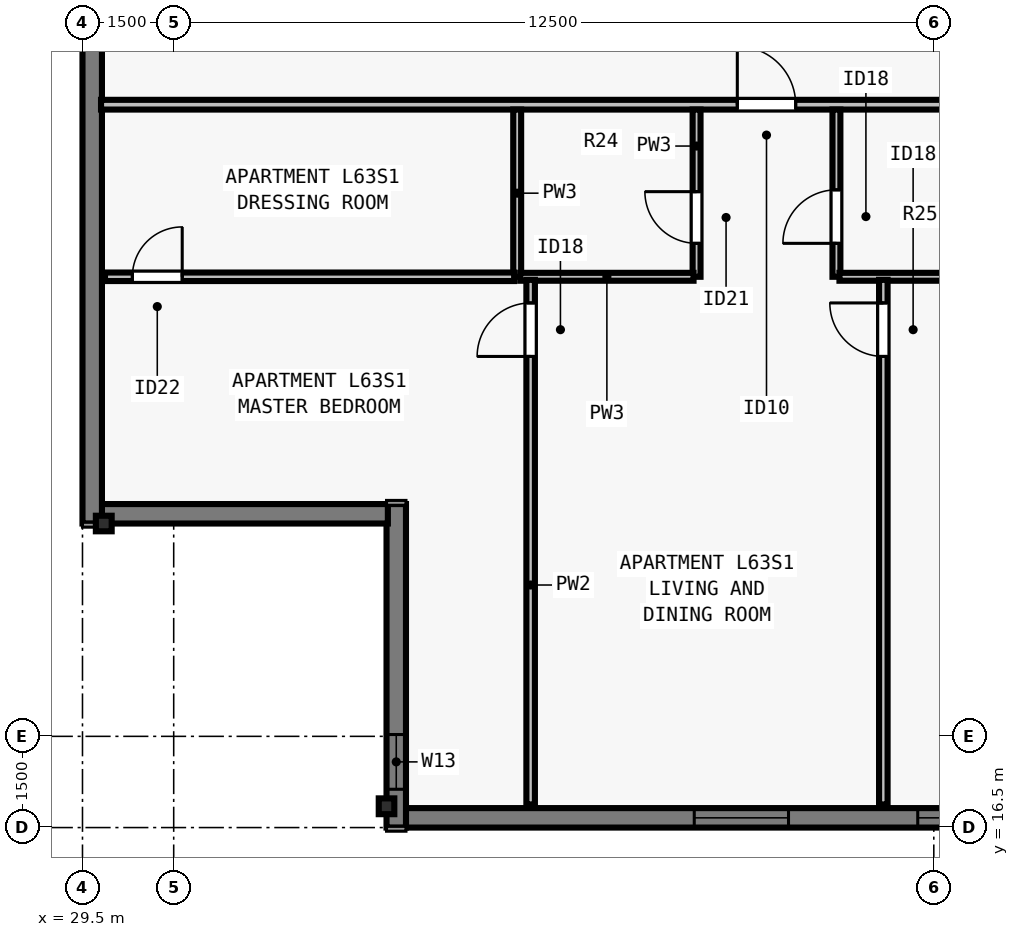
"""IFC4 building model, lengths in metres.
Left out: names, types, materials, properties, quantities, classifications, styles, units other than length and angle.
Written with IfcOpenShell. Run it as: python <this file> out.ifc"""

import sys

from ifc_helpers import new_model, si_unit, direction, frame, frame_2d, origin, origin_2d, place, context, subcontext, project, spatial, rectangle, i_section, extrude, element, fill, save


model = new_model("IFC4")
c1 = context("Model", 3, precision=1e-05, world=origin(), true_north=direction((0.0, 1.0)))
c2 = subcontext(c1, "Body", "Model", "MODEL_VIEW")
j1 = project(units=[si_unit("LENGTHUNIT", "METRE"), si_unit("PLANEANGLEUNIT", "RADIAN")], contexts=[c1])
p1 = place(None, origin())
s1 = spatial("IfcSite", under=j1, at=p1, CompositionType="ELEMENT")
p2 = place(p1, origin())
s2 = spatial("IfcBuilding", under=s1, at=p2, CompositionType="ELEMENT")
p3 = place(p2, frame((0.0, 0.0, 230.5)))
s3 = spatial("IfcBuildingStorey", under=s2, at=p3, CompositionType="ELEMENT", Elevation=230.5)
for number, where, z_axis, x_axis in (
    (1, (34.5, 16.85, 0.0), (0.0, 0.0, 1.0), (1.0, 0.0, 0.0)),
    (2, (29.85, 21.5, 0.0), (0.0, 0.0, 1.0), (0.0, 1.0, 0.0)),
):
    element("IfcColumn", number, at=place(p3, frame(where, z_axis=z_axis, x_axis=x_axis)), inside=s3, PredefinedType="COLUMN", context=c2, shape_type="SweptSolid", body=[
        extrude(i_section(OverallWidth=0.256, OverallDepth=0.26, WebThickness=0.01, FlangeThickness=0.017, FilletRadius=0.013, at=origin_2d()), origin(), (0.0, 0.0, 1.0), 3.5),
    ])
p4 = place(p3, frame((69.5, 16.66, 0.0), z_axis=(0.0, 0.0, 1.0), x_axis=(-1.0, 0.0, 0.0)))
e3 = element("IfcWall", 3, at=p4, inside=s3, PredefinedType="SOLIDWALL", context=c2, shape_type="SweptSolid", body=[
    extrude(rectangle(XDim=34.702, YDim=0.32, at=frame_2d((17.351, 0.0))), origin(), (0.0, 0.0, 1.0), 3.29),
])
p5 = place(p4, frame((5.863, 0.0, 0.8)))
e4 = element("IfcOpeningElement", 4, at=p5, cuts=e3, PredefinedType="OPENING", context=c2, shape_type="SweptSolid", body=[
    extrude(rectangle(XDim=1.85, YDim=1.678, at=frame_2d((0.925, 0.839))), frame((0.0, 0.17, 0.0), z_axis=(0.0, -1.0, 0.0), x_axis=(1.0, 0.0, 0.0)), (0.0, 0.0, 1.0), 0.34),
])
p6 = place(p4, frame((8.138, 0.0, 0.8)))
e5 = element("IfcOpeningElement", 5, at=p6, cuts=e3, PredefinedType="OPENING", context=c2, shape_type="SweptSolid", body=[
    extrude(rectangle(XDim=1.55, YDim=1.678, at=frame_2d((0.775, 0.839))), frame((0.0, 0.17, 0.0), z_axis=(0.0, -1.0, 0.0), x_axis=(1.0, 0.0, 0.0)), (0.0, 0.0, 1.0), 0.34),
])
p7 = place(p4, frame((10.113, 0.0, 0.8)))
e6 = element("IfcOpeningElement", 6, at=p7, cuts=e3, PredefinedType="OPENING", context=c2, shape_type="SweptSolid", body=[
    extrude(rectangle(XDim=1.85, YDim=1.678, at=frame_2d((0.925, 0.839))), frame((0.0, 0.17, 0.0), z_axis=(0.0, -1.0, 0.0), x_axis=(1.0, 0.0, 0.0)), (0.0, 0.0, 1.0), 0.34),
])
p8 = place(p4, frame((14.888, 0.0, 0.8)))
e7 = element("IfcOpeningElement", 7, at=p8, cuts=e3, PredefinedType="OPENING", context=c2, shape_type="SweptSolid", body=[
    extrude(rectangle(XDim=1.55, YDim=1.678, at=frame_2d((0.775, 0.839))), frame((0.0, 0.17, 0.0), z_axis=(0.0, -1.0, 0.0), x_axis=(1.0, 0.0, 0.0)), (0.0, 0.0, 1.0), 0.34),
])
p9 = place(p4, frame((18.564, 0.0, 0.8)))
e8 = element("IfcOpeningElement", 8, at=p9, cuts=e3, PredefinedType="OPENING", context=c2, shape_type="SweptSolid", body=[
    extrude(rectangle(XDim=1.85, YDim=1.678, at=frame_2d((0.925, 0.839))), frame((0.0, 0.17, 0.0), z_axis=(0.0, -1.0, 0.0), x_axis=(1.0, 0.0, 0.0)), (0.0, 0.0, 1.0), 0.34),
])
p10 = place(p4, frame((24.414, 0.0, 0.8)))
e9 = element("IfcOpeningElement", 9, at=p10, cuts=e3, PredefinedType="OPENING", context=c2, shape_type="SweptSolid", body=[
    extrude(rectangle(XDim=1.85, YDim=1.678, at=frame_2d((0.925, 0.839))), frame((0.0, 0.17, 0.0), z_axis=(0.0, -1.0, 0.0), x_axis=(1.0, 0.0, 0.0)), (0.0, 0.0, 1.0), 0.34),
])
p11 = place(p4, frame((28.389, 0.0, 0.8)))
e10 = element("IfcOpeningElement", 10, at=p11, cuts=e3, PredefinedType="OPENING", context=c2, shape_type="SweptSolid", body=[
    extrude(rectangle(XDim=1.55, YDim=1.678, at=frame_2d((0.775, 0.839))), frame((0.0, 0.17, 0.0), z_axis=(0.0, -1.0, 0.0), x_axis=(1.0, 0.0, 0.0)), (0.0, 0.0, 1.0), 0.34),
])
p12 = place(p3, frame((34.66, 16.5, 0.0), z_axis=(0.0, 0.0, 1.0), x_axis=(0.0, 1.0, 0.0)))
e11 = element("IfcWall", 11, at=p12, inside=s3, PredefinedType="SOLIDWALL", context=c2, shape_type="SweptSolid", body=[
    extrude(rectangle(XDim=5.32, YDim=0.32, at=frame_2d((2.66, 0.0))), origin(), (0.0, 0.0, 1.0), 3.29),
])
p13 = place(p12, frame((0.63, 0.0, 0.8)))
e12 = element("IfcOpeningElement", 12, at=p13, cuts=e11, PredefinedType="OPENING", context=c2, shape_type="SweptSolid", body=[
    extrude(rectangle(XDim=0.9, YDim=1.678, at=frame_2d((0.45, 0.839))), frame((0.0, 0.17, 0.0), z_axis=(0.0, -1.0, 0.0), x_axis=(1.0, 0.0, 0.0)), (0.0, 0.0, 1.0), 0.34),
])
p14 = place(p3, frame((34.522, 21.66, 0.0), z_axis=(0.0, 0.0, 1.0), x_axis=(-1.0, 0.0, 0.0)))
e13 = element("IfcWall", 13, at=p14, inside=s3, PredefinedType="SOLIDWALL", context=c2, shape_type="SweptSolid", body=[
    extrude(rectangle(XDim=4.724, YDim=0.32, at=frame_2d((2.362, 0.0))), origin(), (0.0, 0.0, 1.0), 3.29),
])
p15 = place(p3, frame((29.66, 21.5, 0.0), z_axis=(0.0, 0.0, 1.0), x_axis=(0.0, 1.0, 0.0)))
e14 = element("IfcWall", 14, at=p15, inside=s3, PredefinedType="SOLIDWALL", context=c2, shape_type="SweptSolid", body=[
    extrude(rectangle(XDim=23.402, YDim=0.32, at=frame_2d((11.701, 0.0))), origin(), (0.0, 0.0, 1.0), 3.29),
])
p16 = place(p15, frame((9.416, 0.0, 0.8)))
e15 = element("IfcOpeningElement", 15, at=p16, cuts=e14, PredefinedType="OPENING", context=c2, shape_type="SweptSolid", body=[
    extrude(rectangle(XDim=1.55, YDim=1.678, at=frame_2d((0.775, 0.839))), frame((0.0, 0.17, 0.0), z_axis=(0.0, -1.0, 0.0), x_axis=(1.0, 0.0, 0.0)), (0.0, 0.0, 1.0), 0.34),
])
p17 = place(p15, frame((15.886, 0.0, 0.8)))
e16 = element("IfcOpeningElement", 16, at=p17, cuts=e14, PredefinedType="OPENING", context=c2, shape_type="SweptSolid", body=[
    extrude(rectangle(XDim=1.55, YDim=1.678, at=frame_2d((0.775, 0.839))), frame((0.0, 0.17, 0.0), z_axis=(0.0, -1.0, 0.0), x_axis=(1.0, 0.0, 0.0)), (0.0, 0.0, 1.0), 0.34),
])
p18 = place(p15, frame((19.397, 0.0, 0.8)))
e17 = element("IfcOpeningElement", 17, at=p18, cuts=e14, PredefinedType="OPENING", context=c2, shape_type="SweptSolid", body=[
    extrude(rectangle(XDim=1.85, YDim=1.678, at=frame_2d((0.925, 0.839))), frame((0.0, 0.17, 0.0), z_axis=(0.0, -1.0, 0.0), x_axis=(1.0, 0.0, 0.0)), (0.0, 0.0, 1.0), 0.34),
])
p19 = place(p3, frame((29.805, 28.387, 0.0), z_axis=(0.0, 0.0, 1.0), x_axis=(1.0, 0.0, 0.0)))
e18 = element("IfcWall", 18, at=p19, inside=s3, PredefinedType="PARTITIONING", context=c2, shape_type="SweptSolid", body=[
    extrude(rectangle(XDim=44.39, YDim=0.16, at=frame_2d((22.195, 0.0))), origin(), (0.0, 0.0, 1.0), 2.958),
])
p20 = place(p19, frame((10.464, 0.0, 0.0)))
e19 = element("IfcOpeningElement", 19, at=p20, cuts=e18, PredefinedType="OPENING", context=c2, shape_type="SweptSolid", body=[
    extrude(rectangle(XDim=0.96, YDim=2.18, at=frame_2d((0.48, 1.09))), frame((0.0, 0.09, 0.0), z_axis=(0.0, -1.0, 0.0), x_axis=(1.0, 0.0, 0.0)), (0.0, 0.0, 1.0), 0.18),
])
p21 = place(p19, frame((32.544, 0.0, 0.0)))
e20 = element("IfcOpeningElement", 20, at=p21, cuts=e18, PredefinedType="OPENING", context=c2, shape_type="SweptSolid", body=[
    extrude(rectangle(XDim=0.96, YDim=2.18, at=frame_2d((0.48, 1.09))), frame((0.0, 0.09, 0.0), z_axis=(0.0, -1.0, 0.0), x_axis=(1.0, 0.0, 0.0)), (0.0, 0.0, 1.0), 0.18),
])
p22 = place(p3, frame((36.649, 25.558, 0.0), z_axis=(0.0, 0.0, 1.0), x_axis=(0.0, 1.0, 0.0)))
e21 = element("IfcWall", 21, at=p22, inside=s3, PredefinedType="PLUMBINGWALL", context=c2, shape_type="SweptSolid", body=[
    extrude(rectangle(XDim=2.75, YDim=0.13, at=frame_2d((1.375, 0.0))), origin(), (0.0, 0.0, 1.0), 3.29),
])
p23 = place(p3, frame((39.599, 25.558, 0.0), z_axis=(0.0, 0.0, 1.0), x_axis=(0.0, 1.0, 0.0)))
e22 = element("IfcWall", 22, at=p23, inside=s3, PredefinedType="PLUMBINGWALL", context=c2, shape_type="SweptSolid", body=[
    extrude(rectangle(XDim=2.75, YDim=0.13, at=frame_2d((1.375, 0.0))), origin(), (0.0, 0.0, 1.0), 3.29),
])
p24 = place(p23, frame((0.55, 0.0, 0.0)))
e23 = element("IfcOpeningElement", 23, at=p24, cuts=e22, PredefinedType="OPENING", context=c2, shape_type="SweptSolid", body=[
    extrude(rectangle(XDim=0.85, YDim=2.08, at=frame_2d((0.425, 1.04))), frame((0.0, 0.075, 0.0), z_axis=(0.0, -1.0, 0.0), x_axis=(1.0, 0.0, 0.0)), (0.0, 0.0, 1.0), 0.15),
])
p25 = place(p3, frame((36.699, 25.558, 0.0), z_axis=(0.0, 0.0, 1.0), x_axis=(1.0, 0.0, 0.0)))
e24 = element("IfcWall", 24, at=p25, inside=s3, PredefinedType="PLUMBINGWALL", context=c2, shape_type="SweptSolid", body=[
    extrude(rectangle(XDim=2.85, YDim=0.13, at=frame_2d((1.425, 0.0))), origin(), (0.0, 0.0, 1.0), 3.29),
])
p26 = place(p3, frame((41.899, 25.558, 0.0), z_axis=(0.0, 0.0, 1.0), x_axis=(0.0, 1.0, 0.0)))
e25 = element("IfcWall", 25, at=p26, inside=s3, PredefinedType="PLUMBINGWALL", context=c2, shape_type="SweptSolid", body=[
    extrude(rectangle(XDim=2.75, YDim=0.13, at=frame_2d((1.375, 0.0))), origin(), (0.0, 0.0, 1.0), 2.573),
])
p27 = place(p26, frame((0.55, 0.0, 0.0)))
e26 = element("IfcOpeningElement", 26, at=p27, cuts=e25, PredefinedType="OPENING", context=c2, shape_type="SweptSolid", body=[
    extrude(rectangle(XDim=0.88, YDim=2.1, at=frame_2d((0.44, 1.05))), frame((0.0, 0.075, 0.0), z_axis=(0.0, -1.0, 0.0), x_axis=(1.0, 0.0, 0.0)), (0.0, 0.0, 1.0), 0.15),
])
p28 = place(p3, frame((41.949, 25.558, 0.0), z_axis=(0.0, 0.0, 1.0), x_axis=(1.0, 0.0, 0.0)))
e27 = element("IfcWall", 27, at=p28, inside=s3, PredefinedType="PLUMBINGWALL", context=c2, shape_type="SweptSolid", body=[
    extrude(rectangle(XDim=3.15, YDim=0.13, at=frame_2d((1.575, 0.0))), origin(), (0.0, 0.0, 1.0), 3.29),
])
p29 = place(p3, frame((36.87, 16.88, 0.0), z_axis=(0.0, 0.0, 1.0), x_axis=(0.0, 1.0, 0.0)))
e28 = element("IfcWall", 28, at=p29, inside=s3, PredefinedType="PARTITIONING", context=c2, shape_type="SweptSolid", body=[
    extrude(rectangle(XDim=8.628, YDim=0.14, at=frame_2d((4.314, 0.0))), origin(), (0.0, 0.0, 1.0), 2.573),
])
p30 = place(p29, frame((7.367, 0.0, 0.0)))
e29 = element("IfcOpeningElement", 29, at=p30, cuts=e28, PredefinedType="OPENING", context=c2, shape_type="SweptSolid", body=[
    extrude(rectangle(XDim=0.88, YDim=2.1, at=frame_2d((0.44, 1.05))), frame((0.0, 0.08, 0.0), z_axis=(0.0, -1.0, 0.0), x_axis=(1.0, 0.0, 0.0)), (0.0, 0.0, 1.0), 0.16),
])
p31 = place(p3, frame((29.87, 25.558, 0.0), z_axis=(0.0, 0.0, 1.0), x_axis=(1.0, 0.0, 0.0)))
e30 = element("IfcWall", 30, at=p31, inside=s3, PredefinedType="PARTITIONING", context=c2, shape_type="SweptSolid", body=[
    extrude(rectangle(XDim=6.729, YDim=0.14, at=frame_2d((3.364, 0.0))), origin(), (0.0, 0.0, 1.0), 2.958),
])
p32 = place(p31, frame((0.45, 0.0, 0.0)))
e31 = element("IfcOpeningElement", 31, at=p32, cuts=e30, PredefinedType="OPENING", context=c2, shape_type="SweptSolid", body=[
    extrude(rectangle(XDim=0.82, YDim=2.1, at=frame_2d((0.41, 1.05))), frame((0.0, 0.08, 0.0), z_axis=(0.0, -1.0, 0.0), x_axis=(1.0, 0.0, 0.0)), (0.0, 0.0, 1.0), 0.16),
])
p33 = place(p3, frame((42.67, 16.88, 0.0), z_axis=(0.0, 0.0, 1.0), x_axis=(0.0, 1.0, 0.0)))
e32 = element("IfcWall", 32, at=p33, inside=s3, PredefinedType="PARTITIONING", context=c2, shape_type="SweptSolid", body=[
    extrude(rectangle(XDim=8.628, YDim=0.14, at=frame_2d((4.314, 0.0))), origin(), (0.0, 0.0, 1.0), 3.29),
])
p34 = place(p33, frame((7.367, 0.0, 0.0)))
e33 = element("IfcOpeningElement", 33, at=p34, cuts=e32, PredefinedType="OPENING", context=c2, shape_type="SweptSolid", body=[
    extrude(rectangle(XDim=0.88, YDim=2.1, at=frame_2d((0.44, 1.05))), frame((0.0, 0.08, 0.0), z_axis=(0.0, -1.0, 0.0), x_axis=(1.0, 0.0, 0.0)), (0.0, 0.0, 1.0), 0.16),
])
p35 = place(p10, origin())
e34 = element("IfcWindow", 34, at=p35, inside=s3, PartitioningType="SINGLE_PANEL", PredefinedType="WINDOW", context=c2, shape_type="SweptSolid", body=[
    extrude(rectangle(XDim=1.85, YDim=1.678, at=frame_2d((0.925, 0.839))), frame((0.0, -0.05, 0.0), z_axis=(0.0, -1.0, 0.0), x_axis=(1.0, 0.0, 0.0)), (0.0, 0.0, 1.0), 0.06),
])
fill(e9, e34)
p36 = place(p11, origin())
e35 = element("IfcWindow", 35, at=p36, inside=s3, PartitioningType="SINGLE_PANEL", PredefinedType="WINDOW", context=c2, shape_type="SweptSolid", body=[
    extrude(rectangle(XDim=1.55, YDim=1.678, at=frame_2d((0.775, 0.839))), frame((0.0, -0.05, 0.0), z_axis=(0.0, -1.0, 0.0), x_axis=(1.0, 0.0, 0.0)), (0.0, 0.0, 1.0), 0.06),
])
fill(e10, e35)
p37 = place(p13, origin())
e36 = element("IfcWindow", 36, at=p37, inside=s3, PartitioningType="SINGLE_PANEL", PredefinedType="WINDOW", context=c2, shape_type="SweptSolid", body=[
    extrude(rectangle(XDim=0.9, YDim=1.678, at=frame_2d((0.45, 0.839))), frame((0.0, -0.04, 0.0), z_axis=(0.0, -1.0, 0.0), x_axis=(1.0, 0.0, 0.0)), (0.0, 0.0, 1.0), 0.06),
])
fill(e12, e36)
p38 = place(p24, origin())
e37 = element("IfcDoor", 37, at=p38, inside=s3, OperationType="SINGLE_SWING_RIGHT", PredefinedType="DOOR", context=c2, shape_type="SweptSolid", body=[
    extrude(rectangle(XDim=0.85, YDim=2.08, at=frame_2d((0.425, 1.04))), frame((0.0, 0.025, 0.0), z_axis=(0.0, -1.0, 0.0), x_axis=(1.0, 0.0, 0.0)), (0.0, 0.0, 1.0), 0.05),
])
fill(e23, e37)
p39 = place(p27, origin())
e38 = element("IfcDoor", 38, at=p39, inside=s3, OperationType="SINGLE_SWING_LEFT", PredefinedType="DOOR", context=c2, shape_type="SweptSolid", body=[
    extrude(rectangle(XDim=0.88, YDim=2.1, at=frame_2d((0.44, 1.05))), frame((0.0, 0.025, 0.0), z_axis=(0.0, -1.0, 0.0), x_axis=(1.0, 0.0, 0.0)), (0.0, 0.0, 1.0), 0.05),
])
fill(e26, e38)
p40 = place(p32, origin())
e39 = element("IfcDoor", 39, at=p40, inside=s3, OperationType="SINGLE_SWING_RIGHT", PredefinedType="DOOR", context=c2, shape_type="SweptSolid", body=[
    extrude(rectangle(XDim=0.82, YDim=2.1, at=frame_2d((0.41, 1.05))), frame((0.0, 0.025, 0.0), z_axis=(0.0, -1.0, 0.0), x_axis=(1.0, 0.0, 0.0)), (0.0, 0.0, 1.0), 0.05),
])
fill(e31, e39)
p41 = place(p30, origin())
e40 = element("IfcDoor", 40, at=p41, inside=s3, OperationType="SINGLE_SWING_LEFT", PredefinedType="DOOR", context=c2, shape_type="SweptSolid", body=[
    extrude(rectangle(XDim=0.88, YDim=2.1, at=frame_2d((0.44, 1.05))), frame((0.0, 0.025, 0.0), z_axis=(0.0, -1.0, 0.0), x_axis=(1.0, 0.0, 0.0)), (0.0, 0.0, 1.0), 0.05),
])
fill(e29, e40)
p42 = place(p34, origin())
e41 = element("IfcDoor", 41, at=p42, inside=s3, OperationType="SINGLE_SWING_RIGHT", PredefinedType="DOOR", context=c2, shape_type="SweptSolid", body=[
    extrude(rectangle(XDim=0.88, YDim=2.1, at=frame_2d((0.44, 1.05))), frame((0.0, 0.025, 0.0), z_axis=(0.0, -1.0, 0.0), x_axis=(1.0, 0.0, 0.0)), (0.0, 0.0, 1.0), 0.05),
])
fill(e33, e41)
p43 = place(p20, origin())
e42 = element("IfcDoor", 42, at=p43, inside=s3, OperationType="SINGLE_SWING_LEFT", PredefinedType="DOOR", context=c2, shape_type="SweptSolid", body=[
    extrude(rectangle(XDim=0.96, YDim=2.18, at=frame_2d((0.48, 1.09))), frame((0.0, 0.025, 0.0), z_axis=(0.0, -1.0, 0.0), x_axis=(1.0, 0.0, 0.0)), (0.0, 0.0, 1.0), 0.05),
])
fill(e19, e42)
save(model, sys.argv[1])
